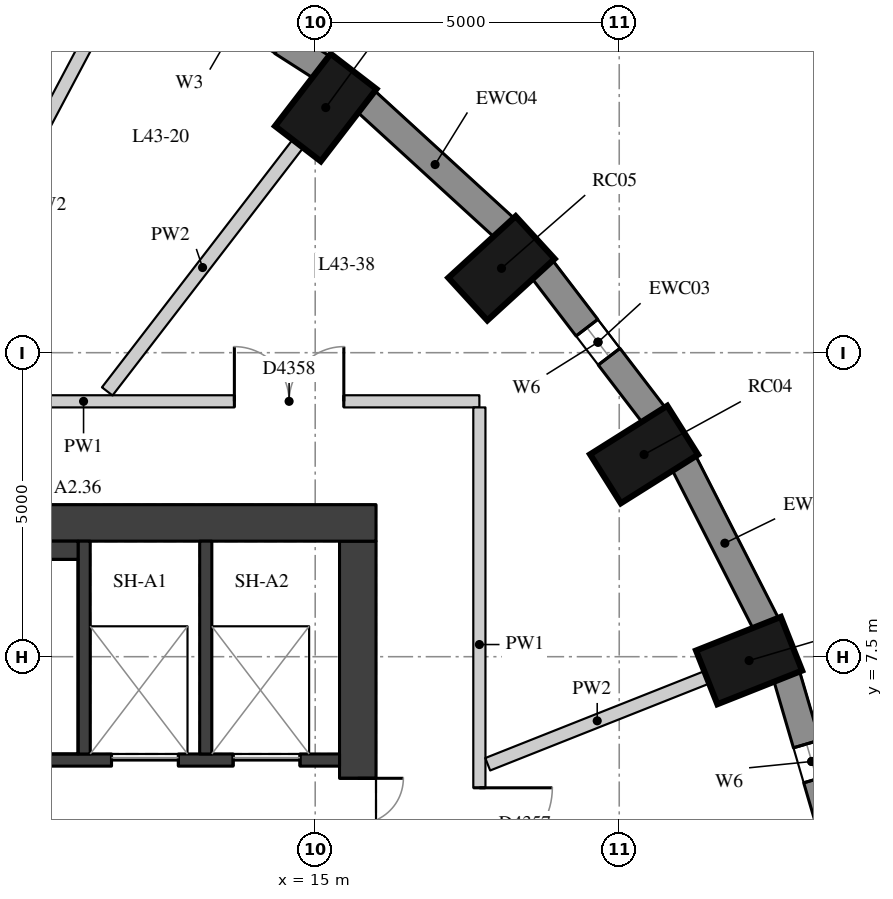
"""IFC4 building model, lengths in metres.
Left out: names, types, materials, properties, quantities, classifications, styles, units other than length and angle.
Written with IfcOpenShell. Run it as: python <this file> out.ifc"""

import sys

from ifc_helpers import new_model, si_unit, direction, frame, frame_2d, origin, origin_2d, place, context, subcontext, project, spatial, rectangle, extrude, element, fill, save


model = new_model("IFC4")
c1 = context("Model", 3, precision=1e-05, world=origin(), true_north=direction((0.0, 1.0)))
c2 = subcontext(c1, "Body", "Model", "MODEL_VIEW")
j1 = project(units=[si_unit("LENGTHUNIT", "METRE"), si_unit("PLANEANGLEUNIT", "RADIAN")], contexts=[c1])
p1 = place(None, origin())
s1 = spatial("IfcSite", under=j1, at=p1, CompositionType="ELEMENT")
p2 = place(p1, origin())
s2 = spatial("IfcBuilding", under=s1, at=p2, CompositionType="ELEMENT")
p3 = place(p2, frame((0.0, 0.0, 155.0)))
s3 = spatial("IfcBuildingStorey", under=s2, at=p3, CompositionType="ELEMENT", Elevation=155.0)
for number, where, z_axis, x_axis in (
    (1, (22.136, 7.436, 0.0), (0.0, 0.0, 1.0), (0.93, 0.369, 0.0)),
    (2, (20.408, 10.825, 0.0), (0.0, 0.0, 1.0), (0.846, 0.533, 0.0)),
    (3, (18.064, 13.888, 0.0), (0.0, 0.0, 1.0), (0.738, 0.675, 0.0)),
    (4, (15.173, 16.532, 0.0), (0.0, 0.0, 1.0), (0.61, 0.792, 0.0)),
):
    element("IfcColumn", number, at=place(p3, frame(where, z_axis=z_axis, x_axis=x_axis)), inside=s3, PredefinedType="COLUMN", context=c2, shape_type="SweptSolid", body=[
        extrude(rectangle(XDim=1.5, YDim=0.95, at=origin_2d()), origin(), (0.0, 0.0, 1.0), 3.3),
    ])
p4 = place(p3, frame((23.58, 4.362, 0.0), z_axis=(0.0, 0.0, 1.0), x_axis=(-0.281049481624, 0.959693278542, 0.0)))
e5 = element("IfcWall", 5, at=p4, inside=s3, PredefinedType="SOLIDWALL", context=c2, shape_type="SweptSolid", body=[
    extrude(rectangle(XDim=2.948, YDim=0.45, at=frame_2d((1.474, 0.0))), origin(), (0.0, 0.0, 1.0), 3.02),
])
p5 = place(p4, frame((1.174, 0.0, 0.4)))
e6 = element("IfcOpeningElement", 6, at=p5, cuts=e5, PredefinedType="OPENING", context=c2, shape_type="SweptSolid", body=[
    extrude(rectangle(XDim=0.6, YDim=1.75, at=frame_2d((0.3, 0.875))), frame((0.0, 0.235, 0.0), z_axis=(0.0, -1.0, 0.0), x_axis=(1.0, 0.0, 0.0)), (0.0, 0.0, 1.0), 0.47),
])
p6 = place(p3, frame((22.415, 8.037, 0.0), z_axis=(0.0, 0.0, 1.0), x_axis=(-0.454133999889, 0.890933392653, 0.0)))
e7 = element("IfcWall", 7, at=p6, inside=s3, PredefinedType="SOLIDWALL", context=c2, shape_type="SweptSolid", body=[
    extrude(rectangle(XDim=2.986, YDim=0.45, at=frame_2d((1.493, 0.0))), origin(), (0.0, 0.0, 1.0), 3.02),
])
p7 = place(p3, frame((20.574, 11.467, 0.0), z_axis=(0.0, 0.0, 1.0), x_axis=(-0.607817056371, 0.794077090706, 0.0)))
e8 = element("IfcWall", 8, at=p7, inside=s3, PredefinedType="SOLIDWALL", context=c2, shape_type="SweptSolid", body=[
    extrude(rectangle(XDim=3.037, YDim=0.45, at=frame_2d((1.519, 0.0))), origin(), (0.0, 0.0, 1.0), 3.02),
])
p8 = place(p7, frame((1.219, 0.0, 0.4)))
e9 = element("IfcOpeningElement", 9, at=p8, cuts=e8, PredefinedType="OPENING", context=c2, shape_type="SweptSolid", body=[
    extrude(rectangle(XDim=0.6, YDim=1.75, at=frame_2d((0.3, 0.875))), frame((0.0, 0.235, 0.0), z_axis=(0.0, -1.0, 0.0), x_axis=(1.0, 0.0, 0.0)), (0.0, 0.0, 1.0), 0.47),
])
p9 = place(p3, frame((18.113, 14.55, 0.0), z_axis=(0.0, 0.0, 1.0), x_axis=(-0.737808755941, 0.675009807082, 0.0)))
e10 = element("IfcWall", 10, at=p9, inside=s3, PredefinedType="SOLIDWALL", context=c2, shape_type="SweptSolid", body=[
    extrude(rectangle(XDim=3.094, YDim=0.45, at=frame_2d((1.547, 0.0))), origin(), (0.0, 0.0, 1.0), 3.02),
])
p10 = place(p3, frame((15.108, 17.193, 0.0), z_axis=(0.0, 0.0, 1.0), x_axis=(-0.842030726237, 0.539429565442, 0.0)))
e11 = element("IfcWall", 11, at=p10, inside=s3, PredefinedType="SOLIDWALL", context=c2, shape_type="SweptSolid", body=[
    extrude(rectangle(XDim=3.151, YDim=0.45, at=frame_2d((1.576, 0.0))), origin(), (0.0, 0.0, 1.0), 3.02),
])
p11 = place(p10, frame((0.776, 0.0, 0.4)))
e12 = element("IfcOpeningElement", 12, at=p11, cuts=e11, PredefinedType="OPENING", context=c2, shape_type="SweptSolid", body=[
    extrude(rectangle(XDim=1.6, YDim=1.75, at=frame_2d((0.8, 0.875))), frame((0.0, 0.235, 0.0), z_axis=(0.0, -1.0, 0.0), x_axis=(1.0, 0.0, 0.0)), (0.0, 0.0, 1.0), 0.47),
])
p12 = place(p3, frame((15.7, -9.4, 0.0), z_axis=(0.0, 0.0, 1.0), x_axis=(0.0, 1.0, 0.0)))
e13 = element("IfcWall", 13, at=p12, inside=s3, PredefinedType="SHEAR", context=c2, shape_type="SweptSolid", body=[
    extrude(rectangle(XDim=18.8, YDim=0.6, at=frame_2d((9.4, 0.0))), origin(), (0.0, 0.0, 1.0), 3.02),
])
p13 = place(p12, frame((13.4, 0.0, 0.0)))
e14 = element("IfcOpeningElement", 14, at=p13, cuts=e13, PredefinedType="OPENING", context=c2, shape_type="SweptSolid", body=[
    extrude(rectangle(XDim=1.5, YDim=2.1, at=frame_2d((0.75, 1.05))), frame((0.0, 0.31, 0.0), z_axis=(0.0, -1.0, 0.0), x_axis=(1.0, 0.0, 0.0)), (0.0, 0.0, 1.0), 0.62),
])
p14 = place(p12, frame((3.9, 0.0, 0.0)))
e15 = element("IfcOpeningElement", 15, at=p14, cuts=e13, PredefinedType="OPENING", context=c2, shape_type="SweptSolid", body=[
    extrude(rectangle(XDim=1.5, YDim=2.1, at=frame_2d((0.75, 1.05))), frame((0.0, 0.31, 0.0), z_axis=(0.0, -1.0, 0.0), x_axis=(1.0, 0.0, 0.0)), (0.0, 0.0, 1.0), 0.62),
])
p15 = place(p3, frame((4.0, 9.7, 0.0), z_axis=(0.0, 0.0, 1.0), x_axis=(1.0, 0.0, 0.0)))
e16 = element("IfcWall", 16, at=p15, inside=s3, PredefinedType="SHEAR", context=c2, shape_type="SweptSolid", body=[
    extrude(rectangle(XDim=12.0, YDim=0.6, at=frame_2d((6.0, 0.0))), origin(), (0.0, 0.0, 1.0), 3.02),
])
p16 = place(p3, frame((4.6, 5.8, 0.0), z_axis=(0.0, 0.0, 1.0), x_axis=(1.0, 0.0, 0.0)))
e17 = element("IfcWall", 17, at=p16, inside=s3, PredefinedType="SHEAR", context=c2, shape_type="SweptSolid", body=[
    extrude(rectangle(XDim=10.8, YDim=0.2, at=frame_2d((5.4, 0.0))), origin(), (0.0, 0.0, 1.0), 3.02),
])
p17 = place(p16, frame((7.05, 0.0, 0.0)))
e18 = element("IfcOpeningElement", 18, at=p17, cuts=e17, PredefinedType="OPENING", context=c2, shape_type="SweptSolid", body=[
    extrude(rectangle(XDim=1.1, YDim=2.1, at=frame_2d((0.55, 1.05))), frame((0.0, 0.11, 0.0), z_axis=(0.0, -1.0, 0.0), x_axis=(1.0, 0.0, 0.0)), (0.0, 0.0, 1.0), 0.22),
])
p18 = place(p16, frame((9.05, 0.0, 0.0)))
e19 = element("IfcOpeningElement", 19, at=p18, cuts=e17, PredefinedType="OPENING", context=c2, shape_type="SweptSolid", body=[
    extrude(rectangle(XDim=1.1, YDim=2.1, at=frame_2d((0.55, 1.05))), frame((0.0, 0.11, 0.0), z_axis=(0.0, -1.0, 0.0), x_axis=(1.0, 0.0, 0.0)), (0.0, 0.0, 1.0), 0.22),
])
for number, where, z_axis, x_axis in (
    (20, (11.2, 5.9, 0.0), (0.0, 0.0, 1.0), (0.0, 1.0, 0.0)),
    (21, (13.2, 5.9, 0.0), (0.0, 0.0, 1.0), (0.0, 1.0, 0.0)),
):
    element("IfcWall", number, at=place(p3, frame(where, z_axis=z_axis, x_axis=x_axis)), inside=s3, PredefinedType="SHEAR", context=c2, shape_type="SweptSolid", body=[
        extrude(rectangle(XDim=3.5, YDim=0.2, at=frame_2d((1.75, 0.0))), origin(), (0.0, 0.0, 1.0), 3.02),
    ])
p19 = place(p3, frame((6.22, 9.25, 0.0), z_axis=(0.0, 0.0, 1.0), x_axis=(1.0, 0.0, 0.0)))
e22 = element("IfcWall", 22, at=p19, inside=s3, PredefinedType="PARTITIONING", context=c2, shape_type="SweptSolid", body=[
    extrude(rectangle(XDim=4.88, YDim=0.3, at=frame_2d((2.44, 0.0))), origin(), (0.0, 0.0, 1.0), 3.02),
])
p20 = place(p3, frame((4.681, 11.7, 0.0), z_axis=(0.0, 0.0, 1.0), x_axis=(1.0, 0.0, 0.0)))
e23 = element("IfcWall", 23, at=p20, inside=s3, PredefinedType="PARTITIONING", context=c2, shape_type="SweptSolid", body=[
    extrude(rectangle(XDim=13.019, YDim=0.2, at=frame_2d((6.51, 0.0))), origin(), (0.0, 0.0, 1.0), 3.02),
])
p21 = place(p20, frame((4.662, 0.0, 0.0)))
e24 = element("IfcOpeningElement", 24, at=p21, cuts=e23, PredefinedType="OPENING", context=c2, shape_type="SweptSolid", body=[
    extrude(rectangle(XDim=0.9, YDim=2.1, at=frame_2d((0.45, 1.05))), frame((0.0, 0.11, 0.0), z_axis=(0.0, -1.0, 0.0), x_axis=(1.0, 0.0, 0.0)), (0.0, 0.0, 1.0), 0.22),
])
p22 = place(p20, frame((8.99, 0.0, 0.0)))
e25 = element("IfcOpeningElement", 25, at=p22, cuts=e23, PredefinedType="OPENING", context=c2, shape_type="SweptSolid", body=[
    extrude(rectangle(XDim=1.8, YDim=2.1, at=frame_2d((0.9, 1.05))), frame((0.0, 0.11, 0.0), z_axis=(0.0, -1.0, 0.0), x_axis=(1.0, 0.0, 0.0)), (0.0, 0.0, 1.0), 0.22),
])
p23 = place(p3, frame((17.7, 11.6, 0.0), z_axis=(0.0, 0.0, 1.0), x_axis=(0.0, -1.0, 0.0)))
e26 = element("IfcWall", 26, at=p23, inside=s3, PredefinedType="PARTITIONING", context=c2, shape_type="SweptSolid", body=[
    extrude(rectangle(XDim=7.8, YDim=0.2, at=frame_2d((3.9, 0.0))), origin(), (0.0, 0.0, 1.0), 3.02),
])
p24 = place(p23, frame((6.256, 0.0, 0.0)))
e27 = element("IfcOpeningElement", 27, at=p24, cuts=e26, PredefinedType="OPENING", context=c2, shape_type="SweptSolid", body=[
    extrude(rectangle(XDim=1.2, YDim=2.1, at=frame_2d((0.6, 1.05))), frame((0.0, 0.11, 0.0), z_axis=(0.0, -1.0, 0.0), x_axis=(1.0, 0.0, 0.0)), (0.0, 0.0, 1.0), 0.22),
])
p25 = place(p3, frame((21.439, 7.16, 0.0), z_axis=(0.0, 0.0, 1.0), x_axis=(-0.929511625875, -0.36879281089, 0.0)))
e28 = element("IfcWall", 28, at=p25, inside=s3, PredefinedType="PARTITIONING", context=c2, shape_type="SweptSolid", body=[
    extrude(rectangle(XDim=3.875, YDim=0.22, at=frame_2d((1.938, 0.0))), origin(), (0.0, 0.0, 1.0), 3.02),
])
p26 = place(p3, frame((14.716, 15.937, 0.0), z_axis=(0.0, 0.0, 1.0), x_axis=(-0.609997597499, -0.792403262894, 0.0)))
e29 = element("IfcWall", 29, at=p26, inside=s3, PredefinedType="PARTITIONING", context=c2, shape_type="SweptSolid", body=[
    extrude(rectangle(XDim=5.141, YDim=0.22, at=frame_2d((2.57, 0.0))), origin(), (0.0, 0.0, 1.0), 3.02),
])
p27 = place(p3, frame((11.474, 18.013, 0.0), z_axis=(0.0, 0.0, 1.0), x_axis=(-0.468047008097, -0.883703569197, 0.0)))
e30 = element("IfcWall", 30, at=p27, inside=s3, PredefinedType="PARTITIONING", context=c2, shape_type="SweptSolid", body=[
    extrude(rectangle(XDim=6.971, YDim=0.22, at=frame_2d((3.486, 0.0))), origin(), (0.0, 0.0, 1.0), 3.02),
])
p28 = place(p5, origin())
e31 = element("IfcWindow", 31, at=p28, inside=s3, PartitioningType="SINGLE_PANEL", PredefinedType="WINDOW", context=c2, shape_type="SweptSolid", body=[
    extrude(rectangle(XDim=0.6, YDim=1.75, at=frame_2d((0.3, 0.875))), frame((0.0, 0.035, 0.0), z_axis=(0.0, -1.0, 0.0), x_axis=(1.0, 0.0, 0.0)), (0.0, 0.0, 1.0), 0.06),
])
fill(e6, e31)
p29 = place(p8, origin())
e32 = element("IfcWindow", 32, at=p29, inside=s3, PartitioningType="SINGLE_PANEL", PredefinedType="WINDOW", context=c2, shape_type="SweptSolid", body=[
    extrude(rectangle(XDim=0.6, YDim=1.75, at=frame_2d((0.3, 0.875))), frame((0.0, 0.035, 0.0), z_axis=(0.0, -1.0, 0.0), x_axis=(1.0, 0.0, 0.0)), (0.0, 0.0, 1.0), 0.06),
])
fill(e9, e32)
p30 = place(p13, origin())
e33 = element("IfcDoor", 33, at=p30, inside=s3, OperationType="DOUBLE_DOOR_SINGLE_SWING", PredefinedType="DOOR", context=c2, shape_type="SweptSolid", body=[
    extrude(rectangle(XDim=1.5, YDim=2.1, at=frame_2d((0.75, 1.05))), frame((0.0, 0.025, 0.0), z_axis=(0.0, -1.0, 0.0), x_axis=(1.0, 0.0, 0.0)), (0.0, 0.0, 1.0), 0.05),
])
fill(e14, e33)
p31 = place(p17, origin())
e34 = element("IfcDoor", 34, at=p31, inside=s3, OperationType="DOUBLE_DOOR_SLIDING", PredefinedType="DOOR", context=c2, shape_type="SweptSolid", body=[
    extrude(rectangle(XDim=1.1, YDim=2.1, at=frame_2d((0.55, 1.05))), frame((0.0, 0.025, 0.0), z_axis=(0.0, -1.0, 0.0), x_axis=(1.0, 0.0, 0.0)), (0.0, 0.0, 1.0), 0.05),
])
fill(e18, e34)
p32 = place(p18, origin())
e35 = element("IfcDoor", 35, at=p32, inside=s3, OperationType="DOUBLE_DOOR_SLIDING", PredefinedType="DOOR", context=c2, shape_type="SweptSolid", body=[
    extrude(rectangle(XDim=1.1, YDim=2.1, at=frame_2d((0.55, 1.05))), frame((0.0, 0.025, 0.0), z_axis=(0.0, -1.0, 0.0), x_axis=(1.0, 0.0, 0.0)), (0.0, 0.0, 1.0), 0.05),
])
fill(e19, e35)
p33 = place(p24, origin())
e36 = element("IfcDoor", 36, at=p33, inside=s3, OperationType="SINGLE_SWING_LEFT", PredefinedType="DOOR", context=c2, shape_type="SweptSolid", body=[
    extrude(rectangle(XDim=1.2, YDim=2.1, at=frame_2d((0.6, 1.05))), frame((0.0, 0.025, 0.0), z_axis=(0.0, -1.0, 0.0), x_axis=(1.0, 0.0, 0.0)), (0.0, 0.0, 1.0), 0.05),
])
fill(e27, e36)
p34 = place(p22, origin())
e37 = element("IfcDoor", 37, at=p34, inside=s3, OperationType="DOUBLE_DOOR_SINGLE_SWING", PredefinedType="DOOR", context=c2, shape_type="SweptSolid", body=[
    extrude(rectangle(XDim=1.8, YDim=2.1, at=frame_2d((0.9, 1.05))), frame((0.0, 0.025, 0.0), z_axis=(0.0, -1.0, 0.0), x_axis=(1.0, 0.0, 0.0)), (0.0, 0.0, 1.0), 0.05),
])
fill(e25, e37)
save(model, sys.argv[1])
